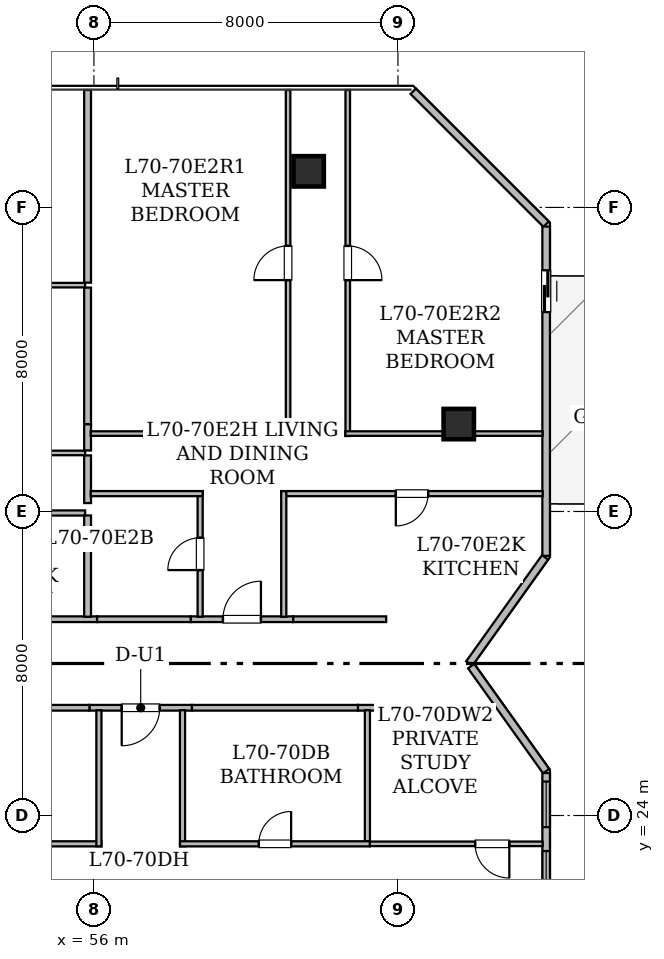
"""IFC4 building model, lengths in metres.
Left out: names, types, materials, properties, quantities, classifications, styles, units other than length and angle.
Written with IfcOpenShell. Run it as: python <this file> out.ifc"""

import sys

from ifc_helpers import new_model, si_unit, direction, frame, frame_2d, origin, origin_2d, place, context, subcontext, project, spatial, rectangle, hollow_rectangle, extrude, element, fill, save


model = new_model("IFC4")
c1 = context("Model", 3, precision=1e-05, world=origin(), true_north=direction((0.0, 1.0)))
c2 = subcontext(c1, "Body", "Model", "MODEL_VIEW")
j1 = project(units=[si_unit("LENGTHUNIT", "METRE"), si_unit("PLANEANGLEUNIT", "RADIAN")], contexts=[c1])
p1 = place(None, origin())
s1 = spatial("IfcSite", under=j1, at=p1, CompositionType="ELEMENT")
p2 = place(p1, origin())
s2 = spatial("IfcBuilding", under=s1, at=p2, CompositionType="ELEMENT")
p3 = place(p2, frame((0.0, 0.0, 273.65)))
s3 = spatial("IfcBuildingStorey", under=s2, at=p3, CompositionType="ELEMENT", Elevation=273.65)
for number, where, z_axis, x_axis in (
    (1, (61.65, 40.95, 0.0), (0.0, 0.0, 1.0), (1.0, 0.0, 0.0)),
    (2, (65.6, 34.3, 0.0), (0.0, 0.0, 1.0), (1.0, 0.0, 0.0)),
):
    element("IfcColumn", number, at=place(p3, frame(where, z_axis=z_axis, x_axis=x_axis)), inside=s3, PredefinedType="COLUMN", context=c2, shape_type="SweptSolid", body=[
        extrude(hollow_rectangle(XDim=0.8, YDim=0.8, WallThickness=0.04, at=origin_2d()), origin(), (0.0, 0.0, 1.0), 4.175),
    ])
p4 = place(p3, frame((64.402, 43.057, 0.0), z_axis=(0.0, 0.0, 1.0), x_axis=(0.707106781187, -0.707106781187, 0.0)))
e3 = element("IfcWall", 3, at=p4, inside=s3, PredefinedType="STANDARD", context=c2, shape_type="SweptSolid", body=[
    extrude(rectangle(XDim=4.947, YDim=0.2, at=frame_2d((2.473, 0.0))), origin(), (0.0, 0.0, 1.0), 3.78),
])
p5 = place(p3, frame((67.9, 39.497, 0.0), z_axis=(0.0, 0.0, 1.0), x_axis=(0.0, -1.0, 0.0)))
e4 = element("IfcWall", 4, at=p5, inside=s3, PredefinedType="STANDARD", context=c2, shape_type="SweptSolid", body=[
    extrude(rectangle(XDim=8.665, YDim=0.2, at=frame_2d((4.333, 0.0))), origin(), (0.0, 0.0, 1.0), 3.78),
])
p6 = place(p5, frame((1.151, 0.0, 0.0)))
e5 = element("IfcOpeningElement", 5, at=p6, cuts=e4, PredefinedType="OPENING", context=c2, shape_type="SweptSolid", body=[
    extrude(rectangle(XDim=1.1, YDim=2.2, at=frame_2d((0.55, 1.1))), frame((0.0, 0.11, 0.0), z_axis=(0.0, -1.0, 0.0), x_axis=(1.0, 0.0, 0.0)), (0.0, 0.0, 1.0), 0.22),
])
p7 = place(p3, frame((67.872, 30.793, 0.0), z_axis=(0.0, 0.0, 1.0), x_axis=(-0.581265107027, -0.813714246743, 0.0)))
e6 = element("IfcWall", 6, at=p7, inside=s3, PredefinedType="STANDARD", context=c2, shape_type="SweptSolid", body=[
    extrude(rectangle(XDim=3.432, YDim=0.2, at=frame_2d((1.716, 0.0))), origin(), (0.0, 0.0, 1.0), 3.78),
])
p8 = place(p3, frame((65.926, 27.931, 0.0), z_axis=(0.0, 0.0, 1.0), x_axis=(0.581306204583, -0.813684887726, 0.0)))
e7 = element("IfcWall", 7, at=p8, inside=s3, PredefinedType="STANDARD", context=c2, shape_type="SweptSolid", body=[
    extrude(rectangle(XDim=3.396, YDim=0.2, at=frame_2d((1.698, 0.0))), origin(), (0.0, 0.0, 1.0), 3.78),
])
p9 = place(p3, frame((67.9, 25.118, 0.0), z_axis=(0.0, 0.0, 1.0), x_axis=(0.0, -1.0, 0.0)))
e8 = element("IfcWall", 8, at=p9, inside=s3, PredefinedType="STANDARD", context=c2, shape_type="SweptSolid", body=[
    extrude(rectangle(XDim=8.677, YDim=0.2, at=frame_2d((4.338, 0.0))), origin(), (0.0, 0.0, 1.0), 3.78),
])
p10 = place(p9, frame((0.224, 0.0, 0.78)))
e9 = element("IfcOpeningElement", 9, at=p10, cuts=e8, PredefinedType="OPENING", context=c2, shape_type="SweptSolid", body=[
    extrude(rectangle(XDim=1.2, YDim=1.5, at=frame_2d((0.6, 0.75))), frame((0.0, 0.11, 0.0), z_axis=(0.0, -1.0, 0.0), x_axis=(1.0, 0.0, 0.0)), (0.0, 0.0, 1.0), 0.22),
])
p11 = place(p9, frame((2.053, 0.0, 0.78)))
e10 = element("IfcOpeningElement", 10, at=p11, cuts=e8, PredefinedType="OPENING", context=c2, shape_type="SweptSolid", body=[
    extrude(rectangle(XDim=1.2, YDim=1.5, at=frame_2d((0.6, 0.75))), frame((0.0, 0.11, 0.0), z_axis=(0.0, -1.0, 0.0), x_axis=(1.0, 0.0, 0.0)), (0.0, 0.0, 1.0), 0.22),
])
p12 = place(p9, frame((4.768, 0.0, 0.85)))
e11 = element("IfcOpeningElement", 11, at=p12, cuts=e8, PredefinedType="OPENING", context=c2, shape_type="SweptSolid", body=[
    extrude(rectangle(XDim=1.8, YDim=0.92, at=frame_2d((0.9, 0.46))), frame((0.0, 0.11, 0.0), z_axis=(0.0, -1.0, 0.0), x_axis=(1.0, 0.0, 0.0)), (0.0, 0.0, 1.0), 0.22),
])
p13 = place(p3, frame((63.69, 26.835, 0.0), z_axis=(0.0, 0.0, 1.0), x_axis=(-1.0, 0.0, 0.0)))
e12 = element("IfcWall", 12, at=p13, inside=s3, PredefinedType="STANDARD", context=c2, shape_type="SweptSolid", body=[
    extrude(rectangle(XDim=0.743, YDim=0.15, at=frame_2d((0.372, 0.0))), origin(), (0.0, 0.0, 1.0), 3.78),
])
p14 = place(p3, frame((58.58, 26.835, 0.0), z_axis=(0.0, 0.0, 1.0), x_axis=(-1.0, 0.0, 0.0)))
e13 = element("IfcWall", 13, at=p14, inside=s3, PredefinedType="STANDARD", context=c2, shape_type="SweptSolid", body=[
    extrude(rectangle(XDim=2.698, YDim=0.15, at=frame_2d((1.349, 0.0))), origin(), (0.0, 0.0, 1.0), 3.78),
])
p15 = place(p14, frame((0.849, 0.0, 0.0)))
e14 = element("IfcOpeningElement", 14, at=p15, cuts=e13, PredefinedType="OPENING", context=c2, shape_type="SweptSolid", body=[
    extrude(rectangle(XDim=1.0, YDim=2.15, at=frame_2d((0.5, 1.075))), frame((0.0, 0.085, 0.0), z_axis=(0.0, -1.0, 0.0), x_axis=(1.0, 0.0, 0.0)), (0.0, 0.0, 1.0), 0.17),
])
p16 = place(p3, frame((62.947, 26.835, 0.0), z_axis=(0.0, 0.0, 1.0), x_axis=(-1.0, 0.0, 0.0)))
e15 = element("IfcWall", 15, at=p16, inside=s3, PredefinedType="STANDARD", context=c2, shape_type="SweptSolid", body=[
    extrude(rectangle(XDim=4.367, YDim=0.15, at=frame_2d((2.184, 0.0))), origin(), (0.0, 0.0, 1.0), 3.78),
])
p17 = place(p3, frame((55.882, 26.835, 0.0), z_axis=(0.0, 0.0, 1.0), x_axis=(-1.0, 0.0, 0.0)))
e16 = element("IfcWall", 16, at=p17, inside=s3, PredefinedType="STANDARD", context=c2, shape_type="SweptSolid", body=[
    extrude(rectangle(XDim=5.138, YDim=0.15, at=frame_2d((2.569, 0.0))), origin(), (0.0, 0.0, 1.0), 2.22),
])
p18 = place(p3, frame((48.923, 29.165, 0.0), z_axis=(0.0, 0.0, 1.0), x_axis=(1.0, 0.0, 0.0)))
e17 = element("IfcWall", 17, at=p18, inside=s3, PredefinedType="STANDARD", context=c2, shape_type="SweptSolid", body=[
    extrude(rectangle(XDim=7.16, YDim=0.15, at=frame_2d((3.58, 0.0))), origin(), (0.0, 0.0, 1.0), 2.22),
])
p19 = place(p3, frame((58.546, 29.165, 0.0), z_axis=(0.0, 0.0, 1.0), x_axis=(1.0, 0.0, 0.0)))
e18 = element("IfcWall", 18, at=p19, inside=s3, PredefinedType="STANDARD", context=c2, shape_type="SweptSolid", body=[
    extrude(rectangle(XDim=2.698, YDim=0.15, at=frame_2d((1.349, 0.0))), origin(), (0.0, 0.0, 1.0), 3.78),
])
p20 = place(p19, frame((0.849, 0.0, 0.0)))
e19 = element("IfcOpeningElement", 19, at=p20, cuts=e18, PredefinedType="OPENING", context=c2, shape_type="SweptSolid", body=[
    extrude(rectangle(XDim=1.0, YDim=2.15, at=frame_2d((0.5, 1.075))), frame((0.0, 0.085, 0.0), z_axis=(0.0, -1.0, 0.0), x_axis=(1.0, 0.0, 0.0)), (0.0, 0.0, 1.0), 0.17),
])
p21 = place(p3, frame((56.083, 29.165, 0.0), z_axis=(0.0, 0.0, 1.0), x_axis=(1.0, 0.0, 0.0)))
e20 = element("IfcWall", 20, at=p21, inside=s3, PredefinedType="STANDARD", context=c2, shape_type="SweptSolid", body=[
    extrude(rectangle(XDim=2.463, YDim=0.15, at=frame_2d((1.231, 0.0))), origin(), (0.0, 0.0, 1.0), 3.78),
])
p22 = place(p3, frame((61.244, 29.165, 0.0), z_axis=(0.0, 0.0, 1.0), x_axis=(1.0, 0.0, 0.0)))
e21 = element("IfcWall", 21, at=p22, inside=s3, PredefinedType="STANDARD", context=c2, shape_type="SweptSolid", body=[
    extrude(rectangle(XDim=2.446, YDim=0.15, at=frame_2d((1.223, 0.0))), origin(), (0.0, 0.0, 1.0), 3.78),
])
p23 = place(p3, frame((67.808, 23.255, 0.0), z_axis=(0.0, 0.0, 1.0), x_axis=(-1.0, 0.0, 0.0)))
e22 = element("IfcWall", 22, at=p23, inside=s3, PredefinedType="PARTITIONING", context=c2, shape_type="SweptSolid", body=[
    extrude(rectangle(XDim=4.547, YDim=0.12, at=frame_2d((2.273, 0.0))), origin(), (0.0, 0.0, 1.0), 2.22),
])
p24 = place(p23, frame((0.877, 0.0, 0.0)))
e23 = element("IfcOpeningElement", 23, at=p24, cuts=e22, PredefinedType="OPENING", context=c2, shape_type="SweptSolid", body=[
    extrude(rectangle(XDim=0.9, YDim=2.1, at=frame_2d((0.45, 1.05))), frame((0.0, 0.07, 0.0), z_axis=(0.0, -1.0, 0.0), x_axis=(1.0, 0.0, 0.0)), (0.0, 0.0, 1.0), 0.14),
])
p25 = place(p3, frame((63.196, 23.32, 0.0), z_axis=(0.0, 0.0, 1.0), x_axis=(0.0, 1.0, 0.0)))
e24 = element("IfcWall", 24, at=p25, inside=s3, PredefinedType="PARTITIONING", context=c2, shape_type="SweptSolid", body=[
    extrude(rectangle(XDim=3.45, YDim=0.135, at=frame_2d((1.725, 0.0))), origin(), (0.0, 0.0, 1.0), 3.78),
])
p26 = place(p3, frame((58.331, 26.77, 0.0), z_axis=(0.0, 0.0, 1.0), x_axis=(0.0, -1.0, 0.0)))
e25 = element("IfcWall", 25, at=p26, inside=s3, PredefinedType="PARTITIONING", context=c2, shape_type="SweptSolid", body=[
    extrude(rectangle(XDim=3.58, YDim=0.135, at=frame_2d((1.79, 0.0))), origin(), (0.0, 0.0, 1.0), 3.78),
])
p27 = place(p3, frame((58.266, 23.255, 0.0), z_axis=(0.0, 0.0, 1.0), x_axis=(1.0, 0.0, 0.0)))
e26 = element("IfcWall", 26, at=p27, inside=s3, PredefinedType="PARTITIONING", context=c2, shape_type="SweptSolid", body=[
    extrude(rectangle(XDim=4.995, YDim=0.135, at=frame_2d((2.498, 0.0))), origin(), (0.0, 0.0, 1.0), 3.78),
])
p28 = place(p27, frame((2.073, 0.0, 0.0)))
e27 = element("IfcOpeningElement", 27, at=p28, cuts=e26, PredefinedType="OPENING", context=c2, shape_type="SweptSolid", body=[
    extrude(rectangle(XDim=0.85, YDim=2.1, at=frame_2d((0.425, 1.05))), frame((0.0, 0.077, 0.0), z_axis=(0.0, -1.0, 0.0), x_axis=(1.0, 0.0, 0.0)), (0.0, 0.0, 1.0), 0.155),
])
p29 = place(p3, frame((50.577, 23.255, 0.0), z_axis=(0.0, 0.0, 1.0), x_axis=(1.0, 0.0, 0.0)))
e28 = element("IfcWall", 28, at=p29, inside=s3, PredefinedType="PARTITIONING", context=c2, shape_type="SweptSolid", body=[
    extrude(rectangle(XDim=5.619, YDim=0.135, at=frame_2d((2.81, 0.0))), origin(), (0.0, 0.0, 1.0), 2.22),
])
p30 = place(p29, frame((2.385, 0.0, 0.0)))
e29 = element("IfcOpeningElement", 29, at=p30, cuts=e28, PredefinedType="OPENING", context=c2, shape_type="SweptSolid", body=[
    extrude(rectangle(XDim=0.85, YDim=2.1, at=frame_2d((0.425, 1.05))), frame((0.0, 0.077, 0.0), z_axis=(0.0, -1.0, 0.0), x_axis=(1.0, 0.0, 0.0)), (0.0, 0.0, 1.0), 0.155),
])
p31 = place(p3, frame((56.131, 23.19, 0.0), z_axis=(0.0, 0.0, 1.0), x_axis=(0.0, 1.0, 0.0)))
e30 = element("IfcWall", 30, at=p31, inside=s3, PredefinedType="PARTITIONING", context=c2, shape_type="SweptSolid", body=[
    extrude(rectangle(XDim=3.58, YDim=0.135, at=frame_2d((1.79, 0.0))), origin(), (0.0, 0.0, 1.0), 3.78),
])
p32 = place(p3, frame((55.768, 31.96, 0.0), z_axis=(0.0, 0.0, 1.0), x_axis=(-1.0, 0.0, 0.0)))
e31 = element("IfcWall", 31, at=p32, inside=s3, PredefinedType="PARTITIONING", context=c2, shape_type="SweptSolid", body=[
    extrude(rectangle(XDim=7.159, YDim=0.135, at=frame_2d((3.58, 0.0))), origin(), (0.0, 0.0, 1.0), 2.22),
])
p33 = place(p32, frame((3.155, 0.0, 0.0)))
e32 = element("IfcOpeningElement", 32, at=p33, cuts=e31, PredefinedType="OPENING", context=c2, shape_type="SweptSolid", body=[
    extrude(rectangle(XDim=0.85, YDim=2.1, at=frame_2d((0.425, 1.05))), frame((0.0, 0.077, 0.0), z_axis=(0.0, -1.0, 0.0), x_axis=(1.0, 0.0, 0.0)), (0.0, 0.0, 1.0), 0.155),
])
p34 = place(p3, frame((49.444, 33.54, 0.0), z_axis=(0.0, 0.0, 1.0), x_axis=(1.0, 0.0, 0.0)))
e33 = element("IfcWall", 33, at=p34, inside=s3, PredefinedType="PARTITIONING", context=c2, shape_type="SweptSolid", body=[
    extrude(rectangle(XDim=6.324, YDim=0.12, at=frame_2d((3.162, 0.0))), origin(), (0.0, 0.0, 1.0), 2.22),
])
p35 = place(p34, frame((2.712, 0.0, 0.0)))
e34 = element("IfcOpeningElement", 34, at=p35, cuts=e33, PredefinedType="OPENING", context=c2, shape_type="SweptSolid", body=[
    extrude(rectangle(XDim=0.9, YDim=2.1, at=frame_2d((0.45, 1.05))), frame((0.0, 0.07, 0.0), z_axis=(0.0, -1.0, 0.0), x_axis=(1.0, 0.0, 0.0)), (0.0, 0.0, 1.0), 0.14),
])
p36 = place(p3, frame((55.833, 33.475, 0.0), z_axis=(0.0, 0.0, 1.0), x_axis=(0.0, -1.0, 0.0)))
e35 = element("IfcWall", 35, at=p36, inside=s3, PredefinedType="STANDARD", context=c2, shape_type="SweptSolid", body=[
    extrude(rectangle(XDim=1.254, YDim=0.18, at=frame_2d((0.627, 0.0))), origin(), (0.0, 0.0, 1.0), 2.22),
])
p37 = place(p3, frame((55.833, 31.895, 0.0), z_axis=(0.0, 0.0, 1.0), x_axis=(0.0, -1.0, 0.0)))
e36 = element("IfcWall", 36, at=p37, inside=s3, PredefinedType="STANDARD", context=c2, shape_type="SweptSolid", body=[
    extrude(rectangle(XDim=2.665, YDim=0.18, at=frame_2d((1.333, 0.0))), origin(), (0.0, 0.0, 1.0), 3.78),
])
p38 = place(p3, frame((49.563, 37.955, 0.0), z_axis=(0.0, 0.0, 1.0), x_axis=(1.0, 0.0, 0.0)))
e37 = element("IfcWall", 37, at=p38, inside=s3, PredefinedType="PARTITIONING", context=c2, shape_type="SweptSolid", body=[
    extrude(rectangle(XDim=6.205, YDim=0.12, at=frame_2d((3.103, 0.0))), origin(), (0.0, 0.0, 1.0), 2.22),
])
p39 = place(p3, frame((55.833, 34.299, 0.0), z_axis=(0.0, 0.0, 1.0), x_axis=(0.0, -1.0, 0.0)))
e38 = element("IfcWall", 38, at=p39, inside=s3, PredefinedType="STANDARD", context=c2, shape_type="SweptSolid", body=[
    extrude(rectangle(XDim=0.694, YDim=0.18, at=frame_2d((0.347, 0.0))), origin(), (0.0, 0.0, 1.0), 2.22),
])
p40 = place(p3, frame((55.833, 37.89, 0.0), z_axis=(0.0, 0.0, 1.0), x_axis=(0.0, -1.0, 0.0)))
e39 = element("IfcWall", 39, at=p40, inside=s3, PredefinedType="STANDARD", context=c2, shape_type="SweptSolid", body=[
    extrude(rectangle(XDim=3.591, YDim=0.18, at=frame_2d((1.795, 0.0))), origin(), (0.0, 0.0, 1.0), 2.22),
])
p41 = place(p3, frame((55.833, 43.09, 0.0), z_axis=(0.0, 0.0, 1.0), x_axis=(0.0, -1.0, 0.0)))
e40 = element("IfcWall", 40, at=p41, inside=s3, PredefinedType="STANDARD", context=c2, shape_type="SweptSolid", body=[
    extrude(rectangle(XDim=5.07, YDim=0.18, at=frame_2d((2.535, 0.0))), origin(), (0.0, 0.0, 1.0), 2.22),
])
p42 = place(p3, frame((58.795, 29.23, 0.0), z_axis=(0.0, 0.0, 1.0), x_axis=(0.0, 1.0, 0.0)))
e41 = element("IfcWall", 41, at=p42, inside=s3, PredefinedType="PARTITIONING", context=c2, shape_type="SweptSolid", body=[
    extrude(rectangle(XDim=3.305, YDim=0.135, at=frame_2d((1.652, 0.0))), origin(), (0.0, 0.0, 1.0), 3.78),
])
p43 = place(p42, frame((1.228, 0.0, 0.0)))
e42 = element("IfcOpeningElement", 42, at=p43, cuts=e41, PredefinedType="OPENING", context=c2, shape_type="SweptSolid", body=[
    extrude(rectangle(XDim=0.85, YDim=2.1, at=frame_2d((0.425, 1.05))), frame((0.0, 0.077, 0.0), z_axis=(0.0, -1.0, 0.0), x_axis=(1.0, 0.0, 0.0)), (0.0, 0.0, 1.0), 0.155),
])
p44 = place(p3, frame((58.86, 32.47, 0.0), z_axis=(0.0, 0.0, 1.0), x_axis=(-1.0, 0.0, 0.0)))
e43 = element("IfcWall", 43, at=p44, inside=s3, PredefinedType="PARTITIONING", context=c2, shape_type="SweptSolid", body=[
    extrude(rectangle(XDim=2.945, YDim=0.135, at=frame_2d((1.473, 0.0))), origin(), (0.0, 0.0, 1.0), 3.78),
])
p45 = place(p3, frame((67.808, 32.47, 0.0), z_axis=(0.0, 0.0, 1.0), x_axis=(-1.0, 0.0, 0.0)))
e44 = element("IfcWall", 44, at=p45, inside=s3, PredefinedType="PARTITIONING", context=c2, shape_type="SweptSolid", body=[
    extrude(rectangle(XDim=6.878, YDim=0.135, at=frame_2d((3.439, 0.0))), origin(), (0.0, 0.0, 1.0), 2.22),
])
p46 = place(p45, frame((3.014, 0.0, 0.0)))
e45 = element("IfcOpeningElement", 45, at=p46, cuts=e44, PredefinedType="OPENING", context=c2, shape_type="SweptSolid", body=[
    extrude(rectangle(XDim=0.85, YDim=2.1, at=frame_2d((0.425, 1.05))), frame((0.0, 0.077, 0.0), z_axis=(0.0, -1.0, 0.0), x_axis=(1.0, 0.0, 0.0)), (0.0, 0.0, 1.0), 0.155),
])
p47 = place(p3, frame((60.995, 32.535, 0.0), z_axis=(0.0, 0.0, 1.0), x_axis=(0.0, -1.0, 0.0)))
e46 = element("IfcWall", 46, at=p47, inside=s3, PredefinedType="PARTITIONING", context=c2, shape_type="SweptSolid", body=[
    extrude(rectangle(XDim=3.305, YDim=0.135, at=frame_2d((1.652, 0.0))), origin(), (0.0, 0.0, 1.0), 3.78),
])
p48 = place(p3, frame((55.915, 34.05, 0.0), z_axis=(0.0, 0.0, 1.0), x_axis=(1.0, 0.0, 0.0)))
e47 = element("IfcWall", 47, at=p48, inside=s3, PredefinedType="PARTITIONING", context=c2, shape_type="SweptSolid", body=[
    extrude(rectangle(XDim=5.259, YDim=0.12, at=frame_2d((2.629, 0.0))), origin(), (0.0, 0.0, 1.0), 2.22),
])
p49 = place(p3, frame((61.109, 33.985, 0.0), z_axis=(0.0, 0.0, 1.0), x_axis=(0.0, 1.0, 0.0)))
e48 = element("IfcWall", 48, at=p49, inside=s3, PredefinedType="PARTITIONING", context=c2, shape_type="SweptSolid", body=[
    extrude(rectangle(XDim=9.105, YDim=0.12, at=frame_2d((4.552, 0.0))), origin(), (0.0, 0.0, 1.0), 2.22),
])
p50 = place(p49, frame((4.103, 0.0, 0.0)))
e49 = element("IfcOpeningElement", 49, at=p50, cuts=e48, PredefinedType="OPENING", context=c2, shape_type="SweptSolid", body=[
    extrude(rectangle(XDim=0.9, YDim=2.1, at=frame_2d((0.45, 1.05))), frame((0.0, 0.07, 0.0), z_axis=(0.0, -1.0, 0.0), x_axis=(1.0, 0.0, 0.0)), (0.0, 0.0, 1.0), 0.14),
])
p51 = place(p3, frame((62.679, 43.09, 0.0), z_axis=(0.0, 0.0, 1.0), x_axis=(0.0, -1.0, 0.0)))
e50 = element("IfcWall", 50, at=p51, inside=s3, PredefinedType="PARTITIONING", context=c2, shape_type="SweptSolid", body=[
    extrude(rectangle(XDim=9.105, YDim=0.12, at=frame_2d((4.552, 0.0))), origin(), (0.0, 0.0, 1.0), 2.22),
])
p52 = place(p51, frame((4.103, 0.0, 0.0)))
e51 = element("IfcOpeningElement", 51, at=p52, cuts=e50, PredefinedType="OPENING", context=c2, shape_type="SweptSolid", body=[
    extrude(rectangle(XDim=0.9, YDim=2.1, at=frame_2d((0.45, 1.05))), frame((0.0, 0.07, 0.0), z_axis=(0.0, -1.0, 0.0), x_axis=(1.0, 0.0, 0.0)), (0.0, 0.0, 1.0), 0.14),
])
p53 = place(p3, frame((62.614, 34.05, 0.0), z_axis=(0.0, 0.0, 1.0), x_axis=(1.0, 0.0, 0.0)))
e52 = element("IfcWall", 52, at=p53, inside=s3, PredefinedType="PARTITIONING", context=c2, shape_type="SweptSolid", body=[
    extrude(rectangle(XDim=5.194, YDim=0.12, at=frame_2d((2.597, 0.0))), origin(), (0.0, 0.0, 1.0), 2.22),
])
p54 = place(p6, origin())
e53 = element("IfcDoor", 53, at=p54, inside=s3, OperationType="SLIDING_TO_LEFT", PredefinedType="DOOR", context=c2, shape_type="SweptSolid", body=[
    extrude(rectangle(XDim=1.1, YDim=2.2, at=frame_2d((0.55, 1.1))), frame((0.0, 0.025, 0.0), z_axis=(0.0, -1.0, 0.0), x_axis=(1.0, 0.0, 0.0)), (0.0, 0.0, 1.0), 0.05),
])
fill(e5, e53)
p55 = place(p10, origin())
e54 = element("IfcWindow", 54, at=p55, inside=s3, PartitioningType="SINGLE_PANEL", PredefinedType="WINDOW", context=c2, shape_type="SweptSolid", body=[
    extrude(rectangle(XDim=1.2, YDim=1.5, at=frame_2d((0.6, 0.75))), frame((0.0, 0.03, 0.0), z_axis=(0.0, -1.0, 0.0), x_axis=(1.0, 0.0, 0.0)), (0.0, 0.0, 1.0), 0.06),
])
fill(e9, e54)
p56 = place(p11, origin())
e55 = element("IfcWindow", 55, at=p56, inside=s3, PartitioningType="SINGLE_PANEL", PredefinedType="WINDOW", context=c2, shape_type="SweptSolid", body=[
    extrude(rectangle(XDim=1.2, YDim=1.5, at=frame_2d((0.6, 0.75))), frame((0.0, 0.03, 0.0), z_axis=(0.0, -1.0, 0.0), x_axis=(1.0, 0.0, 0.0)), (0.0, 0.0, 1.0), 0.06),
])
fill(e10, e55)
p57 = place(p15, origin())
e56 = element("IfcDoor", 56, at=p57, inside=s3, OperationType="SINGLE_SWING_RIGHT", PredefinedType="DOOR", context=c2, shape_type="SweptSolid", body=[
    extrude(rectangle(XDim=1.0, YDim=2.15, at=frame_2d((0.5, 1.075))), frame((0.0, 0.025, 0.0), z_axis=(0.0, -1.0, 0.0), x_axis=(1.0, 0.0, 0.0)), (0.0, 0.0, 1.0), 0.05),
])
fill(e14, e56)
p58 = place(p20, origin())
e57 = element("IfcDoor", 57, at=p58, inside=s3, OperationType="SINGLE_SWING_RIGHT", PredefinedType="DOOR", context=c2, shape_type="SweptSolid", body=[
    extrude(rectangle(XDim=1.0, YDim=2.15, at=frame_2d((0.5, 1.075))), frame((0.0, 0.025, 0.0), z_axis=(0.0, -1.0, 0.0), x_axis=(1.0, 0.0, 0.0)), (0.0, 0.0, 1.0), 0.05),
])
fill(e19, e57)
p59 = place(p24, origin())
e58 = element("IfcDoor", 58, at=p59, inside=s3, OperationType="SINGLE_SWING_LEFT", PredefinedType="DOOR", context=c2, shape_type="SweptSolid", body=[
    extrude(rectangle(XDim=0.9, YDim=2.1, at=frame_2d((0.45, 1.05))), frame((0.0, 0.025, 0.0), z_axis=(0.0, -1.0, 0.0), x_axis=(1.0, 0.0, 0.0)), (0.0, 0.0, 1.0), 0.05),
])
fill(e23, e58)
p60 = place(p28, origin())
e59 = element("IfcDoor", 59, at=p60, inside=s3, OperationType="SINGLE_SWING_RIGHT", PredefinedType="DOOR", context=c2, shape_type="SweptSolid", body=[
    extrude(rectangle(XDim=0.85, YDim=2.1, at=frame_2d((0.425, 1.05))), frame((0.0, 0.025, 0.0), z_axis=(0.0, -1.0, 0.0), x_axis=(1.0, 0.0, 0.0)), (0.0, 0.0, 1.0), 0.05),
])
fill(e27, e59)
p61 = place(p43, origin())
e60 = element("IfcDoor", 60, at=p61, inside=s3, OperationType="SINGLE_SWING_LEFT", PredefinedType="DOOR", context=c2, shape_type="SweptSolid", body=[
    extrude(rectangle(XDim=0.85, YDim=2.1, at=frame_2d((0.425, 1.05))), frame((0.0, 0.025, 0.0), z_axis=(0.0, -1.0, 0.0), x_axis=(1.0, 0.0, 0.0)), (0.0, 0.0, 1.0), 0.05),
])
fill(e42, e60)
p62 = place(p46, origin())
e61 = element("IfcDoor", 61, at=p62, inside=s3, OperationType="SINGLE_SWING_RIGHT", PredefinedType="DOOR", context=c2, shape_type="SweptSolid", body=[
    extrude(rectangle(XDim=0.85, YDim=2.1, at=frame_2d((0.425, 1.05))), frame((0.0, 0.025, 0.0), z_axis=(0.0, -1.0, 0.0), x_axis=(1.0, 0.0, 0.0)), (0.0, 0.0, 1.0), 0.05),
])
fill(e45, e61)
p63 = place(p50, origin())
e62 = element("IfcDoor", 62, at=p63, inside=s3, OperationType="SINGLE_SWING_LEFT", PredefinedType="DOOR", context=c2, shape_type="SweptSolid", body=[
    extrude(rectangle(XDim=0.9, YDim=2.1, at=frame_2d((0.45, 1.05))), frame((0.0, 0.025, 0.0), z_axis=(0.0, -1.0, 0.0), x_axis=(1.0, 0.0, 0.0)), (0.0, 0.0, 1.0), 0.05),
])
fill(e49, e62)
p64 = place(p52, origin())
e63 = element("IfcDoor", 63, at=p64, inside=s3, OperationType="SINGLE_SWING_RIGHT", PredefinedType="DOOR", context=c2, shape_type="SweptSolid", body=[
    extrude(rectangle(XDim=0.9, YDim=2.1, at=frame_2d((0.45, 1.05))), frame((0.0, 0.025, 0.0), z_axis=(0.0, -1.0, 0.0), x_axis=(1.0, 0.0, 0.0)), (0.0, 0.0, 1.0), 0.05),
])
fill(e51, e63)
save(model, sys.argv[1])
